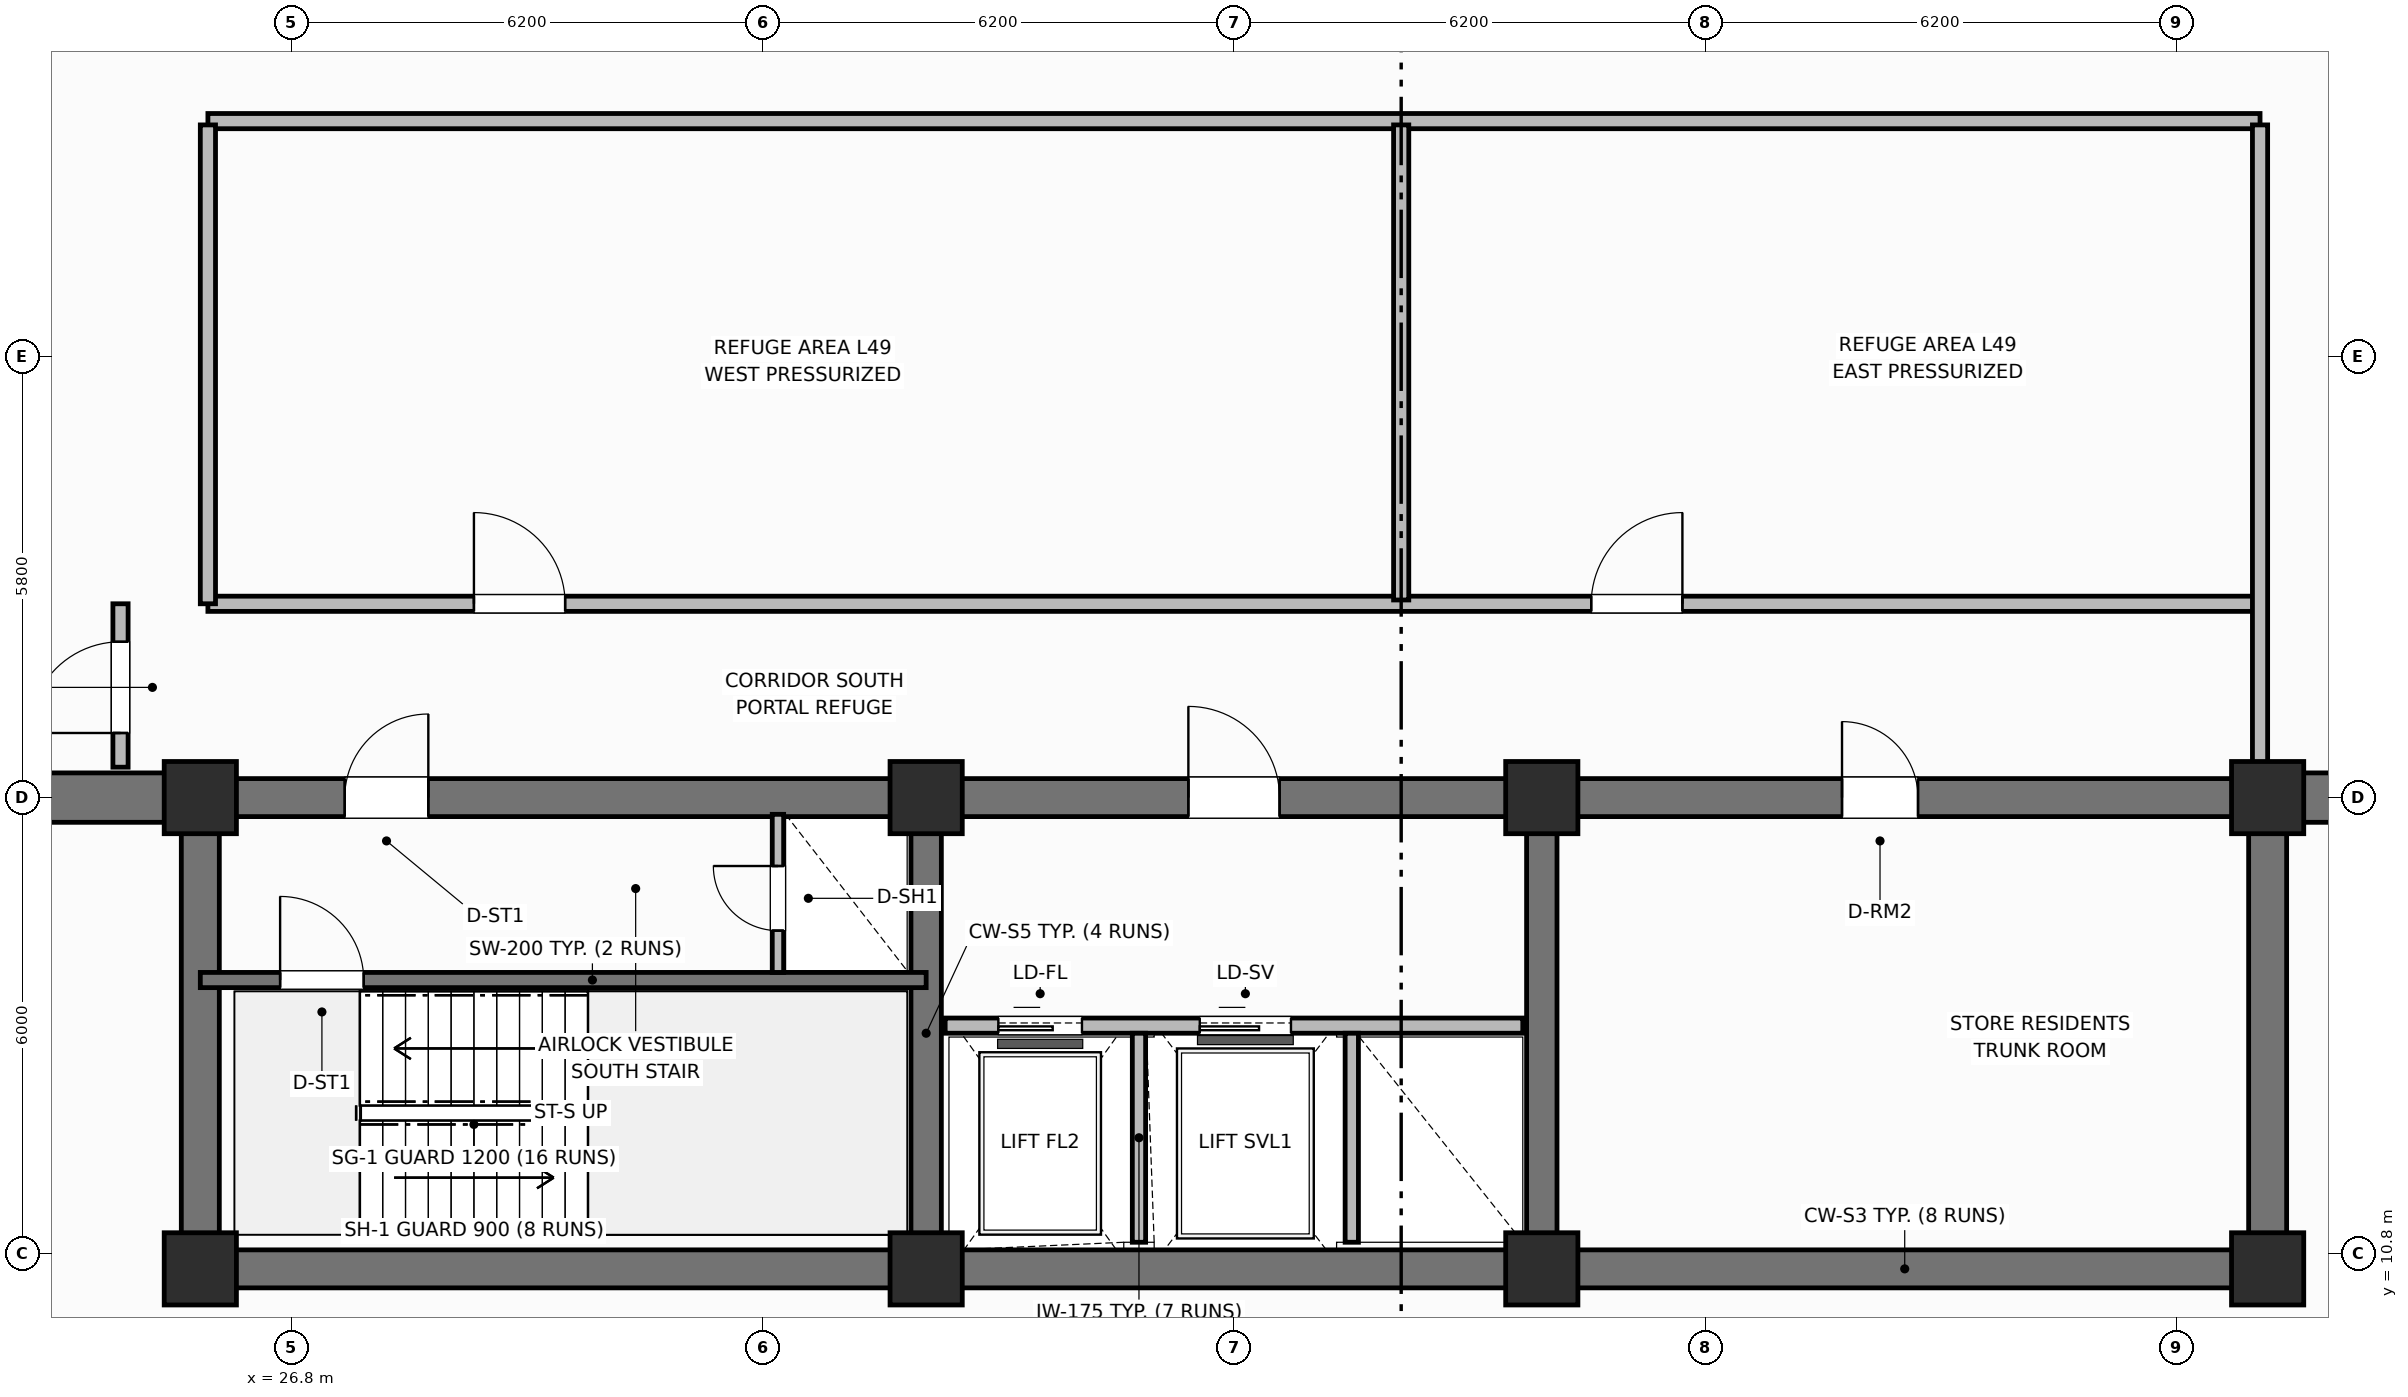
"""IFC4 building model, lengths in metres.
Left out: names, types, materials, properties, quantities, classifications, styles, units other than length and angle.
Written with IfcOpenShell. Run it as: python <this file> out.ifc"""

import sys

from ifc_helpers import new_model, si_unit, direction, frame, frame_2d, origin, origin_2d, place, context, subcontext, project, spatial, rectangle, extrude, element, fill, save


model = new_model("IFC4")
c1 = context("Model", 3, precision=1e-05, world=origin(), true_north=direction((0.0, 1.0)))
c2 = subcontext(c1, "Body", "Model", "MODEL_VIEW")
j1 = project(units=[si_unit("LENGTHUNIT", "METRE"), si_unit("PLANEANGLEUNIT", "RADIAN")], contexts=[c1])
p1 = place(None, origin())
s1 = spatial("IfcSite", under=j1, at=p1, CompositionType="ELEMENT")
p2 = place(p1, origin())
s2 = spatial("IfcBuilding", under=s1, at=p2, CompositionType="ELEMENT")
p3 = place(p2, frame((0.0, 0.0, 195.9)))
s3 = spatial("IfcBuildingStorey", under=s2, at=p3, CompositionType="ELEMENT", Elevation=195.9)
p4 = place(p3, frame((52.8, 10.6, 0.0), z_axis=(0.0, 0.0, 1.0), x_axis=(-1.0, 0.0, 0.0)))
e1 = element("IfcWall", 1, at=p4, inside=s3, PredefinedType="SHEAR", context=c2, shape_type="SweptSolid", body=[
    extrude(rectangle(XDim=27.2, YDim=0.5, at=frame_2d((13.6, 0.0))), origin(), (0.0, 0.0, 1.0), 7.2),
])
for number, where, z_axis, x_axis in (
    (2, (25.6, 10.85, 0.0), (0.0, 0.0, 1.0), (0.0, 1.0, 0.0)),
    (3, (52.8, 10.85, 0.0), (0.0, 0.0, 1.0), (0.0, 1.0, 0.0)),
):
    element("IfcWall", number, at=place(p3, frame(where, z_axis=z_axis, x_axis=x_axis)), inside=s3, PredefinedType="SHEAR", context=c2, shape_type="SweptSolid", body=[
        extrude(rectangle(XDim=5.7, YDim=0.5, at=frame_2d((2.85, 0.0))), origin(), (0.0, 0.0, 1.0), 7.2),
    ])
p5 = place(p3, frame((25.6, 16.8, 0.0), z_axis=(0.0, 0.0, 1.0), x_axis=(1.0, 0.0, 0.0)))
e4 = element("IfcWall", 4, at=p5, inside=s3, PredefinedType="SHEAR", context=c2, shape_type="SweptSolid", body=[
    extrude(rectangle(XDim=27.2, YDim=0.5, at=frame_2d((13.6, 0.0))), origin(), (0.0, 0.0, 1.0), 7.2),
])
p6 = place(p5, frame((1.9, 0.0, 0.0)))
e5 = element("IfcOpeningElement", 5, at=p6, cuts=e4, PredefinedType="OPENING", context=c2, shape_type="SweptSolid", body=[
    extrude(rectangle(XDim=1.1, YDim=2.15, at=frame_2d((0.55, 1.075))), frame((0.0, 0.26, 0.0), z_axis=(0.0, -1.0, 0.0), x_axis=(1.0, 0.0, 0.0)), (0.0, 0.0, 1.0), 0.52),
])
p7 = place(p5, frame((13.0, 0.0, 0.0)))
e6 = element("IfcOpeningElement", 6, at=p7, cuts=e4, PredefinedType="OPENING", context=c2, shape_type="SweptSolid", body=[
    extrude(rectangle(XDim=1.2, YDim=2.15, at=frame_2d((0.6, 1.075))), frame((0.0, 0.26, 0.0), z_axis=(0.0, -1.0, 0.0), x_axis=(1.0, 0.0, 0.0)), (0.0, 0.0, 1.0), 0.52),
])
p8 = place(p5, frame((21.6, 0.0, 0.0)))
e7 = element("IfcOpeningElement", 7, at=p8, cuts=e4, PredefinedType="OPENING", context=c2, shape_type="SweptSolid", body=[
    extrude(rectangle(XDim=1.0, YDim=2.15, at=frame_2d((0.5, 1.075))), frame((0.0, 0.26, 0.0), z_axis=(0.0, -1.0, 0.0), x_axis=(1.0, 0.0, 0.0)), (0.0, 0.0, 1.0), 0.52),
])
for number, where, z_axis, x_axis in (
    (8, (35.15, 10.85, 0.0), (0.0, 0.0, 1.0), (0.0, 1.0, 0.0)),
    (9, (43.25, 10.85, 0.0), (0.0, 0.0, 1.0), (0.0, 1.0, 0.0)),
):
    element("IfcWall", number, at=place(p3, frame(where, z_axis=z_axis, x_axis=x_axis)), inside=s3, PredefinedType="SHEAR", context=c2, shape_type="SweptSolid", body=[
        extrude(rectangle(XDim=5.7, YDim=0.4, at=frame_2d((2.85, 0.0))), origin(), (0.0, 0.0, 1.0), 7.2),
    ])
for number, where, z_axis, x_axis in (
    (10, (25.6, 10.6, 0.0), (0.0, 0.0, 1.0), (1.0, 0.0, 0.0)),
    (11, (25.6, 16.8, 0.0), (0.0, 0.0, 1.0), (1.0, 0.0, 0.0)),
    (12, (35.15, 10.6, 0.0), (0.0, 0.0, 1.0), (1.0, 0.0, 0.0)),
    (13, (35.15, 16.8, 0.0), (0.0, 0.0, 1.0), (1.0, 0.0, 0.0)),
    (14, (43.25, 10.6, 0.0), (0.0, 0.0, 1.0), (1.0, 0.0, 0.0)),
    (15, (43.25, 16.8, 0.0), (0.0, 0.0, 1.0), (1.0, 0.0, 0.0)),
    (16, (52.8, 10.6, 0.0), (0.0, 0.0, 1.0), (1.0, 0.0, 0.0)),
    (17, (52.8, 16.8, 0.0), (0.0, 0.0, 1.0), (1.0, 0.0, 0.0)),
):
    element("IfcColumn", number, at=place(p3, frame(where, z_axis=z_axis, x_axis=x_axis)), inside=s3, PredefinedType="COLUMN", context=c2, shape_type="SweptSolid", body=[
        extrude(rectangle(XDim=0.95, YDim=0.95, at=origin_2d()), origin(), (0.0, 0.0, 1.0), 7.2),
    ])
for number, where, z_axis, x_axis in (
    (18, (17.05, 16.8, 0.0), (0.0, 0.0, 1.0), (1.0, 0.0, 0.0)),
    (19, (52.8, 16.8, 0.0), (0.0, 0.0, 1.0), (1.0, 0.0, 0.0)),
):
    element("IfcWall", number, at=place(p3, frame(where, z_axis=z_axis, x_axis=x_axis)), inside=s3, PredefinedType="SHEAR", context=c2, shape_type="SweptSolid", body=[
        extrude(rectangle(XDim=8.55, YDim=0.65, at=frame_2d((4.275, 0.0))), origin(), (0.0, 0.0, 1.0), 6.94),
    ])
p9 = place(p3, frame((25.6, 14.4, 0.0), z_axis=(0.0, 0.0, 1.0), x_axis=(1.0, 0.0, 0.0)))
e20 = element("IfcWall", 20, at=p9, inside=s3, PredefinedType="SHEAR", context=c2, shape_type="SweptSolid", body=[
    extrude(rectangle(XDim=9.55, YDim=0.2, at=frame_2d((4.775, 0.0))), origin(), (0.0, 0.0, 1.0), 7.2),
])
p10 = place(p9, frame((1.05, 0.0, 0.0)))
e21 = element("IfcOpeningElement", 21, at=p10, cuts=e20, PredefinedType="OPENING", context=c2, shape_type="SweptSolid", body=[
    extrude(rectangle(XDim=1.1, YDim=2.15, at=frame_2d((0.55, 1.075))), frame((0.0, 0.11, 0.0), z_axis=(0.0, -1.0, 0.0), x_axis=(1.0, 0.0, 0.0)), (0.0, 0.0, 1.0), 0.22),
])
p11 = place(p3, frame((33.2, 14.5, 0.0), z_axis=(0.0, 0.0, 1.0), x_axis=(0.0, 1.0, 0.0)))
e22 = element("IfcWall", 22, at=p11, inside=s3, PredefinedType="PARTITIONING", context=c2, shape_type="SweptSolid", body=[
    extrude(rectangle(XDim=2.08, YDim=0.15, at=frame_2d((1.04, 0.0))), origin(), (0.0, 0.0, 1.0), 6.0),
])
p12 = place(p11, frame((0.55, 0.0, 0.0)))
e23 = element("IfcOpeningElement", 23, at=p12, cuts=e22, PredefinedType="OPENING", context=c2, shape_type="SweptSolid", body=[
    extrude(rectangle(XDim=0.85, YDim=2.05, at=frame_2d((0.425, 1.025))), frame((0.0, 0.085, 0.0), z_axis=(0.0, -1.0, 0.0), x_axis=(1.0, 0.0, 0.0)), (0.0, 0.0, 1.0), 0.17),
])
p13 = place(p3, frame((35.4, 13.8, 0.0), z_axis=(0.0, 0.0, 1.0), x_axis=(1.0, 0.0, 0.0)))
e24 = element("IfcWall", 24, at=p13, inside=s3, PredefinedType="PARTITIONING", context=c2, shape_type="SweptSolid", body=[
    extrude(rectangle(XDim=7.6, YDim=0.2, at=frame_2d((3.8, 0.0))), origin(), (0.0, 0.0, 1.0), 5.82),
])
p14 = place(p13, frame((0.7, 0.0, 0.0)))
e25 = element("IfcOpeningElement", 25, at=p14, cuts=e24, PredefinedType="OPENING", context=c2, shape_type="SweptSolid", body=[
    extrude(rectangle(XDim=1.1, YDim=2.15, at=frame_2d((0.55, 1.075))), frame((0.0, 0.11, 0.0), z_axis=(0.0, -1.0, 0.0), x_axis=(1.0, 0.0, 0.0)), (0.0, 0.0, 1.0), 0.22),
])
p15 = place(p13, frame((3.35, 0.0, 0.0)))
e26 = element("IfcOpeningElement", 26, at=p15, cuts=e24, PredefinedType="OPENING", context=c2, shape_type="SweptSolid", body=[
    extrude(rectangle(XDim=1.2, YDim=2.15, at=frame_2d((0.6, 1.075))), frame((0.0, 0.11, 0.0), z_axis=(0.0, -1.0, 0.0), x_axis=(1.0, 0.0, 0.0)), (0.0, 0.0, 1.0), 0.22),
])
for number, where, z_axis, x_axis in (
    (27, (37.95, 10.95, 0.0), (0.0, 0.0, 1.0), (0.0, 1.0, 0.0)),
    (28, (40.75, 10.95, 0.0), (0.0, 0.0, 1.0), (0.0, 1.0, 0.0)),
):
    element("IfcWall", number, at=place(p3, frame(where, z_axis=z_axis, x_axis=x_axis)), inside=s3, PredefinedType="PARTITIONING", context=c2, shape_type="SweptSolid", body=[
        extrude(rectangle(XDim=2.75, YDim=0.175, at=frame_2d((1.375, 0.0))), origin(), (0.0, 0.0, 1.0), 6.0),
    ])
p16 = place(p3, frame((25.7, 19.35, 0.0), z_axis=(0.0, 0.0, 1.0), x_axis=(1.0, 0.0, 0.0)))
e29 = element("IfcWall", 29, at=p16, inside=s3, PredefinedType="PARTITIONING", context=c2, shape_type="SweptSolid", body=[
    extrude(rectangle(XDim=27.0, YDim=0.2, at=frame_2d((13.5, 0.0))), origin(), (0.0, 0.0, 1.0), 6.0),
])
p17 = place(p16, frame((3.5, 0.0, 0.0)))
e30 = element("IfcOpeningElement", 30, at=p17, cuts=e29, PredefinedType="OPENING", context=c2, shape_type="SweptSolid", body=[
    extrude(rectangle(XDim=1.2, YDim=2.15, at=frame_2d((0.6, 1.075))), frame((0.0, 0.11, 0.0), z_axis=(0.0, -1.0, 0.0), x_axis=(1.0, 0.0, 0.0)), (0.0, 0.0, 1.0), 0.22),
])
p18 = place(p16, frame((18.2, 0.0, 0.0)))
e31 = element("IfcOpeningElement", 31, at=p18, cuts=e29, PredefinedType="OPENING", context=c2, shape_type="SweptSolid", body=[
    extrude(rectangle(XDim=1.2, YDim=2.15, at=frame_2d((0.6, 1.075))), frame((0.0, 0.11, 0.0), z_axis=(0.0, -1.0, 0.0), x_axis=(1.0, 0.0, 0.0)), (0.0, 0.0, 1.0), 0.22),
])
p19 = place(p3, frame((25.7, 25.7, 0.0), z_axis=(0.0, 0.0, 1.0), x_axis=(1.0, 0.0, 0.0)))
e32 = element("IfcWall", 32, at=p19, inside=s3, PredefinedType="PARTITIONING", context=c2, shape_type="SweptSolid", body=[
    extrude(rectangle(XDim=27.0, YDim=0.2, at=frame_2d((13.5, 0.0))), origin(), (0.0, 0.0, 1.0), 6.0),
])
p20 = place(p3, frame((41.4, 19.4, 0.0), z_axis=(0.0, 0.0, 1.0), x_axis=(0.0, 1.0, 0.0)))
e33 = element("IfcWall", 33, at=p20, inside=s3, PredefinedType="PARTITIONING", context=c2, shape_type="SweptSolid", body=[
    extrude(rectangle(XDim=6.25, YDim=0.2, at=frame_2d((3.125, 0.0))), origin(), (0.0, 0.0, 1.0), 6.0),
])
p21 = place(p3, frame((24.55, 17.2, 0.0), z_axis=(0.0, 0.0, 1.0), x_axis=(0.0, 1.0, 0.0)))
e34 = element("IfcWall", 34, at=p21, inside=s3, PredefinedType="PARTITIONING", context=c2, shape_type="SweptSolid", body=[
    extrude(rectangle(XDim=2.15, YDim=0.2, at=frame_2d((1.075, 0.0))), origin(), (0.0, 0.0, 1.0), 6.0),
])
p22 = place(p21, frame((0.45, 0.0, 0.0)))
e35 = element("IfcOpeningElement", 35, at=p22, cuts=e34, PredefinedType="OPENING", context=c2, shape_type="SweptSolid", body=[
    extrude(rectangle(XDim=1.2, YDim=2.15, at=frame_2d((0.6, 1.075))), frame((0.0, 0.11, 0.0), z_axis=(0.0, -1.0, 0.0), x_axis=(1.0, 0.0, 0.0)), (0.0, 0.0, 1.0), 0.22),
])
p23 = place(p3, frame((25.7, 19.35, 0.0), z_axis=(0.0, 0.0, 1.0), x_axis=(0.0, 1.0, 0.0)))
e36 = element("IfcWall", 36, at=p23, inside=s3, PredefinedType="PARTITIONING", context=c2, shape_type="SweptSolid", body=[
    extrude(rectangle(XDim=6.3, YDim=0.2, at=frame_2d((3.15, 0.0))), origin(), (0.0, 0.0, 1.0), 6.0),
])
p24 = place(p3, frame((52.7, 17.2, 0.0), z_axis=(0.0, 0.0, 1.0), x_axis=(0.0, 1.0, 0.0)))
e37 = element("IfcWall", 37, at=p24, inside=s3, PredefinedType="PARTITIONING", context=c2, shape_type="SweptSolid", body=[
    extrude(rectangle(XDim=8.45, YDim=0.2, at=frame_2d((4.225, 0.0))), origin(), (0.0, 0.0, 1.0), 6.0),
])
p25 = place(p10, origin())
e38 = element("IfcDoor", 38, at=p25, inside=s3, OperationType="SINGLE_SWING_LEFT", PredefinedType="DOOR", context=c2, shape_type="SweptSolid", body=[
    extrude(rectangle(XDim=1.1, YDim=2.15, at=frame_2d((0.55, 1.075))), frame((0.0, 0.025, 0.0), z_axis=(0.0, -1.0, 0.0), x_axis=(1.0, 0.0, 0.0)), (0.0, 0.0, 1.0), 0.05),
])
fill(e21, e38)
p26 = place(p12, origin())
e39 = element("IfcDoor", 39, at=p26, inside=s3, OperationType="SINGLE_SWING_RIGHT", PredefinedType="TRAPDOOR", context=c2, shape_type="SweptSolid", body=[
    extrude(rectangle(XDim=0.85, YDim=2.05, at=frame_2d((0.425, 1.025))), frame((0.0, 0.025, 0.0), z_axis=(0.0, -1.0, 0.0), x_axis=(1.0, 0.0, 0.0)), (0.0, 0.0, 1.0), 0.05),
])
fill(e23, e39)
p27 = place(p14, origin())
e40 = element("IfcDoor", 40, at=p27, inside=s3, OperationType="SLIDING_TO_LEFT", PredefinedType="DOOR", context=c2, shape_type="SweptSolid", body=[
    extrude(rectangle(XDim=1.1, YDim=2.15, at=frame_2d((0.55, 1.075))), frame((0.0, 0.025, 0.0), z_axis=(0.0, -1.0, 0.0), x_axis=(1.0, 0.0, 0.0)), (0.0, 0.0, 1.0), 0.05),
])
fill(e25, e40)
p28 = place(p15, origin())
e41 = element("IfcDoor", 41, at=p28, inside=s3, OperationType="SLIDING_TO_LEFT", PredefinedType="DOOR", context=c2, shape_type="SweptSolid", body=[
    extrude(rectangle(XDim=1.2, YDim=2.15, at=frame_2d((0.6, 1.075))), frame((0.0, 0.025, 0.0), z_axis=(0.0, -1.0, 0.0), x_axis=(1.0, 0.0, 0.0)), (0.0, 0.0, 1.0), 0.05),
])
fill(e26, e41)
p29 = place(p17, origin())
e42 = element("IfcDoor", 42, at=p29, inside=s3, OperationType="SINGLE_SWING_LEFT", PredefinedType="DOOR", context=c2, shape_type="SweptSolid", body=[
    extrude(rectangle(XDim=1.2, YDim=2.15, at=frame_2d((0.6, 1.075))), frame((0.0, 0.025, 0.0), z_axis=(0.0, -1.0, 0.0), x_axis=(1.0, 0.0, 0.0)), (0.0, 0.0, 1.0), 0.05),
])
fill(e30, e42)
p30 = place(p18, origin())
e43 = element("IfcDoor", 43, at=p30, inside=s3, OperationType="SINGLE_SWING_RIGHT", PredefinedType="DOOR", context=c2, shape_type="SweptSolid", body=[
    extrude(rectangle(XDim=1.2, YDim=2.15, at=frame_2d((0.6, 1.075))), frame((0.0, 0.025, 0.0), z_axis=(0.0, -1.0, 0.0), x_axis=(1.0, 0.0, 0.0)), (0.0, 0.0, 1.0), 0.05),
])
fill(e31, e43)
p31 = place(p22, origin())
e44 = element("IfcDoor", 44, at=p31, inside=s3, OperationType="SINGLE_SWING_LEFT", PredefinedType="DOOR", context=c2, shape_type="SweptSolid", body=[
    extrude(rectangle(XDim=1.2, YDim=2.15, at=frame_2d((0.6, 1.075))), frame((0.0, 0.025, 0.0), z_axis=(0.0, -1.0, 0.0), x_axis=(1.0, 0.0, 0.0)), (0.0, 0.0, 1.0), 0.05),
])
fill(e35, e44)
p32 = place(p6, origin())
e45 = element("IfcDoor", 45, at=p32, inside=s3, OperationType="SINGLE_SWING_RIGHT", PredefinedType="DOOR", context=c2, shape_type="SweptSolid", body=[
    extrude(rectangle(XDim=1.1, YDim=2.15, at=frame_2d((0.55, 1.075))), frame((0.0, 0.025, 0.0), z_axis=(0.0, -1.0, 0.0), x_axis=(1.0, 0.0, 0.0)), (0.0, 0.0, 1.0), 0.05),
])
fill(e5, e45)
p33 = place(p7, origin())
e46 = element("IfcDoor", 46, at=p33, inside=s3, OperationType="SINGLE_SWING_LEFT", PredefinedType="DOOR", context=c2, shape_type="SweptSolid", body=[
    extrude(rectangle(XDim=1.2, YDim=2.15, at=frame_2d((0.6, 1.075))), frame((0.0, 0.025, 0.0), z_axis=(0.0, -1.0, 0.0), x_axis=(1.0, 0.0, 0.0)), (0.0, 0.0, 1.0), 0.05),
])
fill(e6, e46)
p34 = place(p8, origin())
e47 = element("IfcDoor", 47, at=p34, inside=s3, OperationType="SINGLE_SWING_LEFT", PredefinedType="DOOR", context=c2, shape_type="SweptSolid", body=[
    extrude(rectangle(XDim=1.0, YDim=2.15, at=frame_2d((0.5, 1.075))), frame((0.0, 0.025, 0.0), z_axis=(0.0, -1.0, 0.0), x_axis=(1.0, 0.0, 0.0)), (0.0, 0.0, 1.0), 0.05),
])
fill(e7, e47)
save(model, sys.argv[1])
